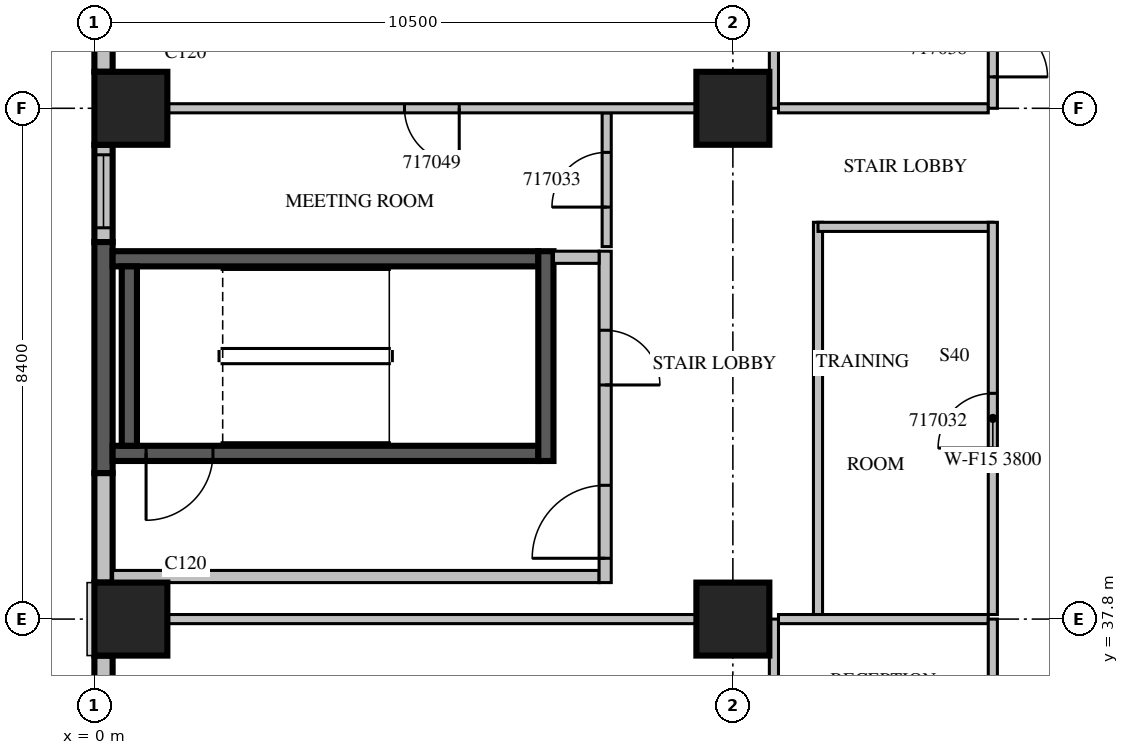
"""IFC4 building model, lengths in metres.
Left out: names, types, materials, properties, quantities, classifications, styles, units other than length and angle.
Written with IfcOpenShell. Run it as: python <this file> out.ifc"""

import sys

from ifc_helpers import new_model, si_unit, direction, frame, frame_2d, origin, origin_2d, place, context, subcontext, project, spatial, rectangle, extrude, source, transform, mapped, element, fill, save


model = new_model("IFC4")
c1 = context("Model", 3, precision=1e-05, world=origin(), true_north=direction((0.0, 1.0)))
c2 = subcontext(c1, "Body", "Model", "MODEL_VIEW")
j1 = project(units=[si_unit("LENGTHUNIT", "METRE"), si_unit("PLANEANGLEUNIT", "RADIAN")], contexts=[c1])
p1 = place(None, origin())
s1 = spatial("IfcSite", under=j1, at=p1, CompositionType="ELEMENT")
p2 = place(p1, origin())
s2 = spatial("IfcBuilding", under=s1, at=p2, CompositionType="ELEMENT")
p3 = place(p2, frame((0.0, 0.0, 82.5)))
s3 = spatial("IfcBuildingStorey", under=s2, at=p3, CompositionType="ELEMENT", Elevation=82.5)
m1 = source(origin(), c2, "Body", "SweptSolid", [
    extrude(rectangle(XDim=1.2, YDim=1.2, at=origin_2d()), origin(), (0.0, 0.0, 1.0), 4.2),
])
for number, where, z_axis, x_axis in (
    (1, (0.6, 37.8, 0.0), (0.0, 0.0, 1.0), (1.0, 0.0, 0.0)),
    (2, (10.5, 37.8, 0.0), (0.0, 0.0, 1.0), (1.0, 0.0, 0.0)),
    (3, (0.6, 46.2, 0.0), (0.0, 0.0, 1.0), (1.0, 0.0, 0.0)),
    (4, (10.5, 46.2, 0.0), (0.0, 0.0, 1.0), (1.0, 0.0, 0.0)),
):
    element("IfcColumn", number, at=place(p3, frame(where, z_axis=z_axis, x_axis=x_axis)), inside=s3, PredefinedType="COLUMN", context=c2, shape_type="MappedRepresentation", body=[
        mapped(m1, transform((0.0, 0.0, 0.0), scale=1.0)),
    ])
m2 = source(origin(), c2, "Body", "SweptSolid", [
    extrude(rectangle(XDim=4.68, YDim=0.3, at=frame_2d((2.34, 0.0))), origin(), (0.0, 0.0, 1.0), 3.8),
])
p4 = place(p3, frame((0.15, 51.48, 0.0), z_axis=(0.0, 0.0, 1.0), x_axis=(0.0, -1.0, 0.0)))
e5 = element("IfcWall", 5, at=p4, inside=s3, PredefinedType="STANDARD", context=c2, shape_type="MappedRepresentation", body=[
    mapped(m2, transform((0.0, 0.0, 0.0), scale=1.0)),
])
m3 = source(origin(), c2, "Body", "SweptSolid", [
    extrude(rectangle(XDim=1.0, YDim=2.1, at=frame_2d((0.5, 1.05))), frame((0.0, 0.16, 0.0), z_axis=(0.0, -1.0, 0.0), x_axis=(1.0, 0.0, 0.0)), (0.0, 0.0, 1.0), 0.32),
])
p5 = place(p4, frame((1.945, 0.0, 0.0)))
e6 = element("IfcOpeningElement", 6, at=p5, cuts=e5, PredefinedType="OPENING", context=c2, shape_type="MappedRepresentation", body=[
    mapped(m3, transform((0.0, 0.0, 0.0), scale=1.0)),
])
m4 = source(origin(), c2, "Body", "SweptSolid", [
    extrude(rectangle(XDim=1.6, YDim=0.3, at=frame_2d((0.8, 0.0))), origin(), (0.0, 0.0, 1.0), 3.8),
])
p6 = place(p3, frame((0.15, 45.6, 0.0), z_axis=(0.0, 0.0, 1.0), x_axis=(0.0, -1.0, 0.0)))
e7 = element("IfcWall", 7, at=p6, inside=s3, PredefinedType="STANDARD", context=c2, shape_type="MappedRepresentation", body=[
    mapped(m4, transform((0.0, 0.0, 0.0), scale=1.0)),
])
m5 = source(origin(), c2, "Body", "SweptSolid", [
    extrude(rectangle(XDim=1.2, YDim=2.7, at=frame_2d((0.6, 1.35))), frame((0.0, 0.16, 0.0), z_axis=(0.0, -1.0, 0.0), x_axis=(1.0, 0.0, 0.0)), (0.0, 0.0, 1.0), 0.32),
])
p7 = place(p6, frame((0.165, 0.0, 0.6)))
e8 = element("IfcOpeningElement", 8, at=p7, cuts=e7, PredefinedType="OPENING", context=c2, shape_type="MappedRepresentation", body=[
    mapped(m5, transform((0.0, 0.0, 0.0), scale=1.0)),
])
m6 = source(origin(), c2, "Body", "SweptSolid", [
    extrude(rectangle(XDim=3.8, YDim=0.3, at=frame_2d((1.9, 0.0))), origin(), (0.0, 0.0, 1.0), 3.8),
])
p8 = place(p3, frame((0.15, 44.0, 0.0), z_axis=(0.0, 0.0, 1.0), x_axis=(0.0, -1.0, 0.0)))
e9 = element("IfcWall", 9, at=p8, inside=s3, PredefinedType="SOLIDWALL", context=c2, shape_type="MappedRepresentation", body=[
    mapped(m6, transform((0.0, 0.0, 0.0), scale=1.0)),
])
m7 = source(origin(), c2, "Body", "SweptSolid", [
    extrude(rectangle(XDim=1.8, YDim=0.3, at=frame_2d((0.9, 0.0))), origin(), (0.0, 0.0, 1.0), 3.8),
])
p9 = place(p3, frame((0.15, 40.2, 0.0), z_axis=(0.0, 0.0, 1.0), x_axis=(0.0, -1.0, 0.0)))
e10 = element("IfcWall", 10, at=p9, inside=s3, PredefinedType="STANDARD", context=c2, shape_type="MappedRepresentation", body=[
    mapped(m7, transform((0.0, 0.0, 0.0), scale=1.0)),
])
m8 = source(origin(), c2, "Body", "SweptSolid", [
    extrude(rectangle(XDim=7.2, YDim=0.3, at=frame_2d((3.6, 0.0))), origin(), (0.0, 0.0, 1.0), 3.8),
])
p10 = place(p3, frame((0.15, 37.2, 0.0), z_axis=(0.0, 0.0, 1.0), x_axis=(0.0, -1.0, 0.0)))
e11 = element("IfcWall", 11, at=p10, inside=s3, PredefinedType="STANDARD", context=c2, shape_type="MappedRepresentation", body=[
    mapped(m8, transform((0.0, 0.0, 0.0), scale=1.0)),
])
m9 = source(origin(), c2, "Body", "SweptSolid", [
    extrude(rectangle(XDim=1.8, YDim=2.7, at=frame_2d((0.9, 1.35))), frame((0.0, 0.16, 0.0), z_axis=(0.0, -1.0, 0.0), x_axis=(1.0, 0.0, 0.0)), (0.0, 0.0, 1.0), 0.32),
])
p11 = place(p10, frame((1.008, 0.0, 0.6)))
e12 = element("IfcOpeningElement", 12, at=p11, cuts=e11, PredefinedType="OPENING", context=c2, shape_type="MappedRepresentation", body=[
    mapped(m9, transform((0.0, 0.0, 0.0), scale=1.0)),
])
m10 = source(origin(), c2, "Body", "SweptSolid", [
    extrude(rectangle(XDim=2.4, YDim=2.7, at=frame_2d((1.2, 1.35))), frame((0.0, 0.16, 0.0), z_axis=(0.0, -1.0, 0.0), x_axis=(1.0, 0.0, 0.0)), (0.0, 0.0, 1.0), 0.32),
])
p12 = place(p10, frame((3.804, 0.0, 0.6)))
e13 = element("IfcOpeningElement", 13, at=p12, cuts=e11, PredefinedType="OPENING", context=c2, shape_type="MappedRepresentation", body=[
    mapped(m10, transform((0.0, 0.0, 0.0), scale=1.0)),
])
m11 = source(origin(), c2, "Body", "SweptSolid", [
    extrude(rectangle(XDim=7.0, YDim=0.25, at=frame_2d((3.5, 0.0))), origin(), (0.0, 0.0, 1.0), 3.8),
])
p13 = place(p3, frame((0.3, 40.525, 0.0), z_axis=(0.0, 0.0, 1.0), x_axis=(1.0, 0.0, 0.0)))
e14 = element("IfcWall", 14, at=p13, inside=s3, PredefinedType="SOLIDWALL", context=c2, shape_type="MappedRepresentation", body=[
    mapped(m11, transform((0.0, 0.0, 0.0), scale=1.0)),
])
m12 = source(origin(), c2, "Body", "SweptSolid", [
    extrude(rectangle(XDim=1.1, YDim=2.1, at=frame_2d((0.55, 1.05))), frame((0.0, 0.135, 0.0), z_axis=(0.0, -1.0, 0.0), x_axis=(1.0, 0.0, 0.0)), (0.0, 0.0, 1.0), 0.27),
])
p14 = place(p13, frame((0.55, 0.0, 0.0)))
e15 = element("IfcOpeningElement", 15, at=p14, cuts=e14, PredefinedType="OPENING", context=c2, shape_type="MappedRepresentation", body=[
    mapped(m12, transform((0.0, 0.0, 0.0), scale=1.0)),
])
p15 = place(p3, frame((0.3, 43.725, 0.0), z_axis=(0.0, 0.0, 1.0), x_axis=(1.0, 0.0, 0.0)))
e16 = element("IfcWall", 16, at=p15, inside=s3, PredefinedType="SOLIDWALL", context=c2, shape_type="MappedRepresentation", body=[
    mapped(m11, transform((0.0, 0.0, 0.0), scale=1.0)),
])
m13 = source(origin(), c2, "Body", "SweptSolid", [
    extrude(rectangle(XDim=3.45, YDim=0.25, at=frame_2d((1.725, 0.0))), origin(), (0.0, 0.0, 1.0), 3.8),
])
p16 = place(p3, frame((7.425, 40.4, 0.0), z_axis=(0.0, 0.0, 1.0), x_axis=(0.0, 1.0, 0.0)))
e17 = element("IfcWall", 17, at=p16, inside=s3, PredefinedType="SOLIDWALL", context=c2, shape_type="MappedRepresentation", body=[
    mapped(m13, transform((0.0, 0.0, 0.0), scale=1.0)),
])
m14 = source(origin(), c2, "Body", "SweptSolid", [
    extrude(rectangle(XDim=2.95, YDim=0.25, at=frame_2d((1.475, 0.0))), origin(), (0.0, 0.0, 1.0), 3.8),
])
p17 = place(p3, frame((0.575, 40.65, 0.0), z_axis=(0.0, 0.0, 1.0), x_axis=(0.0, 1.0, 0.0)))
e18 = element("IfcWall", 18, at=p17, inside=s3, PredefinedType="SOLIDWALL", context=c2, shape_type="MappedRepresentation", body=[
    mapped(m14, transform((0.0, 0.0, 0.0), scale=1.0)),
])
m15 = source(origin(), c2, "Body", "SweptSolid", [
    extrude(rectangle(XDim=8.0, YDim=0.2, at=frame_2d((4.0, 0.0))), origin(), (0.0, 0.0, 1.0), 3.8),
])
p18 = place(p3, frame((0.3, 38.5, 0.0), z_axis=(0.0, 0.0, 1.0), x_axis=(1.0, 0.0, 0.0)))
e19 = element("IfcWall", 19, at=p18, inside=s3, PredefinedType="PARTITIONING", context=c2, shape_type="MappedRepresentation", body=[
    mapped(m15, transform((0.0, 0.0, 0.0), scale=1.0)),
])
m16 = source(origin(), c2, "Body", "SweptSolid", [
    extrude(rectangle(XDim=5.45, YDim=0.2, at=frame_2d((2.725, 0.0))), origin(), (0.0, 0.0, 1.0), 3.8),
])
p19 = place(p3, frame((8.4, 38.4, 0.0), z_axis=(0.0, 0.0, 1.0), x_axis=(0.0, 1.0, 0.0)))
e20 = element("IfcWall", 20, at=p19, inside=s3, PredefinedType="PARTITIONING", context=c2, shape_type="MappedRepresentation", body=[
    mapped(m16, transform((0.0, 0.0, 0.0), scale=1.0)),
])
m17 = source(origin(), c2, "Body", "SweptSolid", [
    extrude(rectangle(XDim=1.2, YDim=2.1, at=frame_2d((0.6, 1.05))), frame((0.0, 0.11, 0.0), z_axis=(0.0, -1.0, 0.0), x_axis=(1.0, 0.0, 0.0)), (0.0, 0.0, 1.0), 0.22),
])
p20 = place(p19, frame((0.4, 0.0, 0.0)))
e21 = element("IfcOpeningElement", 21, at=p20, cuts=e20, PredefinedType="OPENING", context=c2, shape_type="MappedRepresentation", body=[
    mapped(m17, transform((0.0, 0.0, 0.0), scale=1.0)),
])
m18 = source(origin(), c2, "Body", "SweptSolid", [
    extrude(rectangle(XDim=0.9, YDim=2.1, at=frame_2d((0.45, 1.05))), frame((0.0, 0.11, 0.0), z_axis=(0.0, -1.0, 0.0), x_axis=(1.0, 0.0, 0.0)), (0.0, 0.0, 1.0), 0.22),
])
p21 = place(p19, frame((3.25, 0.0, 0.0)))
e22 = element("IfcOpeningElement", 22, at=p21, cuts=e20, PredefinedType="OPENING", context=c2, shape_type="MappedRepresentation", body=[
    mapped(m18, transform((0.0, 0.0, 0.0), scale=1.0)),
])
m19 = source(origin(), c2, "Body", "SweptSolid", [
    extrude(rectangle(XDim=0.75, YDim=0.2, at=frame_2d((0.375, 0.0))), origin(), (0.0, 0.0, 1.0), 3.8),
])
p22 = place(p3, frame((7.55, 43.75, 0.0), z_axis=(0.0, 0.0, 1.0), x_axis=(1.0, 0.0, 0.0)))
e23 = element("IfcWall", 23, at=p22, inside=s3, PredefinedType="PARTITIONING", context=c2, shape_type="MappedRepresentation", body=[
    mapped(m19, transform((0.0, 0.0, 0.0), scale=1.0)),
])
m20 = source(origin(), c2, "Body", "SweptSolid", [
    extrude(rectangle(XDim=6.45, YDim=0.15, at=frame_2d((3.225, 0.0))), origin(), (0.0, 0.0, 1.0), 3.8),
])
p23 = place(p3, frame((11.9, 44.325, 0.0), z_axis=(0.0, 0.0, 1.0), x_axis=(0.0, -1.0, 0.0)))
e24 = element("IfcWall", 24, at=p23, inside=s3, PredefinedType="PARTITIONING", context=c2, shape_type="MappedRepresentation", body=[
    mapped(m20, transform((0.0, 0.0, 0.0), scale=1.0)),
])
m21 = source(origin(), c2, "Body", "SweptSolid", [
    extrude(rectangle(XDim=2.875, YDim=0.15, at=frame_2d((1.438, 0.0))), origin(), (0.0, 0.0, 1.0), 3.8),
])
p24 = place(p3, frame((14.775, 44.25, 0.0), z_axis=(0.0, 0.0, 1.0), x_axis=(-1.0, 0.0, 0.0)))
e25 = element("IfcWall", 25, at=p24, inside=s3, PredefinedType="PARTITIONING", context=c2, shape_type="MappedRepresentation", body=[
    mapped(m21, transform((0.0, 0.0, 0.0), scale=1.0)),
])
p25 = place(p3, frame((14.775, 37.875, 0.0), z_axis=(0.0, 0.0, 1.0), x_axis=(0.0, 1.0, 0.0)))
e26 = element("IfcWall", 26, at=p25, inside=s3, PredefinedType="PARTITIONING", context=c2, shape_type="MappedRepresentation", body=[
    mapped(m20, transform((0.0, 0.0, 0.0), scale=1.0)),
])
m22 = source(origin(), c2, "Body", "SweptSolid", [
    extrude(rectangle(XDim=0.9, YDim=2.1, at=frame_2d((0.45, 1.05))), frame((0.0, 0.085, 0.0), z_axis=(0.0, -1.0, 0.0), x_axis=(1.0, 0.0, 0.0)), (0.0, 0.0, 1.0), 0.17),
])
p26 = place(p25, frame((2.737, 0.0, 0.0)))
e27 = element("IfcOpeningElement", 27, at=p26, cuts=e26, PredefinedType="OPENING", context=c2, shape_type="MappedRepresentation", body=[
    mapped(m22, transform((0.0, 0.0, 0.0), scale=1.0)),
])
m23 = source(origin(), c2, "Body", "SweptSolid", [
    extrude(rectangle(XDim=2.2, YDim=0.15, at=frame_2d((1.1, 0.0))), origin(), (0.0, 0.0, 1.0), 3.8),
])
p27 = place(p3, frame((8.425, 43.925, 0.0), z_axis=(0.0, 0.0, 1.0), x_axis=(0.0, 1.0, 0.0)))
e28 = element("IfcWall", 28, at=p27, inside=s3, PredefinedType="PARTITIONING", context=c2, shape_type="MappedRepresentation", body=[
    mapped(m23, transform((0.0, 0.0, 0.0), scale=1.0)),
])
p28 = place(p27, frame((0.65, 0.0, 0.0)))
e29 = element("IfcOpeningElement", 29, at=p28, cuts=e28, PredefinedType="OPENING", context=c2, shape_type="MappedRepresentation", body=[
    mapped(m22, transform((0.0, 0.0, 0.0), scale=1.0)),
])
m24 = source(origin(), c2, "Body", "SweptSolid", [
    extrude(rectangle(XDim=8.702, YDim=0.15, at=frame_2d((4.351, 0.0))), origin(), (0.0, 0.0, 1.0), 3.8),
])
p29 = place(p3, frame((9.901, 37.8, 0.0), z_axis=(0.0, 0.0, 1.0), x_axis=(-1.0, 0.0, 0.0)))
e30 = element("IfcWall", 30, at=p29, inside=s3, PredefinedType="PARTITIONING", context=c2, shape_type="MappedRepresentation", body=[
    mapped(m24, transform((0.0, 0.0, 0.0), scale=1.0)),
])
m25 = source(origin(), c2, "Body", "SweptSolid", [
    extrude(rectangle(XDim=3.45, YDim=0.15, at=frame_2d((1.725, 0.0))), origin(), (0.0, 0.0, 1.0), 3.8),
])
p30 = place(p3, frame((14.7, 37.8, 0.0), z_axis=(0.0, 0.0, 1.0), x_axis=(-1.0, 0.0, 0.0)))
e31 = element("IfcWall", 31, at=p30, inside=s3, PredefinedType="PARTITIONING", context=c2, shape_type="MappedRepresentation", body=[
    mapped(m25, transform((0.0, 0.0, 0.0), scale=1.0)),
])
m26 = source(origin(), c2, "Body", "SweptSolid", [
    extrude(rectangle(XDim=8.4, YDim=0.15, at=frame_2d((4.2, 0.0))), origin(), (0.0, 0.0, 1.0), 3.8),
])
p31 = place(p3, frame((11.175, 29.4, 0.0), z_axis=(0.0, 0.0, 1.0), x_axis=(0.0, 1.0, 0.0)))
e32 = element("IfcWall", 32, at=p31, inside=s3, PredefinedType="PARTITIONING", context=c2, shape_type="MappedRepresentation", body=[
    mapped(m26, transform((0.0, 0.0, 0.0), scale=1.0)),
])
m27 = source(origin(), c2, "Body", "SweptSolid", [
    extrude(rectangle(XDim=1.1, YDim=2.1, at=frame_2d((0.55, 1.05))), frame((0.0, 0.085, 0.0), z_axis=(0.0, -1.0, 0.0), x_axis=(1.0, 0.0, 0.0)), (0.0, 0.0, 1.0), 0.17),
])
p32 = place(p31, frame((5.883, 0.0, 0.0)))
e33 = element("IfcOpeningElement", 33, at=p32, cuts=e32, PredefinedType="OPENING", context=c2, shape_type="MappedRepresentation", body=[
    mapped(m27, transform((0.0, 0.0, 0.0), scale=1.0)),
])
p33 = place(p3, frame((9.901, 46.2, 0.0), z_axis=(0.0, 0.0, 1.0), x_axis=(-1.0, 0.0, 0.0)))
e34 = element("IfcWall", 34, at=p33, inside=s3, PredefinedType="PARTITIONING", context=c2, shape_type="MappedRepresentation", body=[
    mapped(m24, transform((0.0, 0.0, 0.0), scale=1.0)),
])
p34 = place(p33, frame((3.901, 0.0, 0.0)))
e35 = element("IfcOpeningElement", 35, at=p34, cuts=e34, PredefinedType="OPENING", context=c2, shape_type="MappedRepresentation", body=[
    mapped(m22, transform((0.0, 0.0, 0.0), scale=1.0)),
])
p35 = place(p3, frame((14.7, 46.2, 0.0), z_axis=(0.0, 0.0, 1.0), x_axis=(-1.0, 0.0, 0.0)))
e36 = element("IfcWall", 36, at=p35, inside=s3, PredefinedType="PARTITIONING", context=c2, shape_type="MappedRepresentation", body=[
    mapped(m25, transform((0.0, 0.0, 0.0), scale=1.0)),
])
p36 = place(p3, frame((11.175, 46.2, 0.0), z_axis=(0.0, 0.0, 1.0), x_axis=(0.0, 1.0, 0.0)))
e37 = element("IfcWall", 37, at=p36, inside=s3, PredefinedType="PARTITIONING", context=c2, shape_type="SweptSolid", body=[
    extrude(rectangle(XDim=13.235, YDim=0.15, at=frame_2d((6.617, 0.0))), origin(), (0.0, 0.0, 1.0), 3.3),
])
p37 = place(p3, frame((14.775, 29.4, 0.0), z_axis=(0.0, 0.0, 1.0), x_axis=(0.0, 1.0, 0.0)))
e38 = element("IfcWall", 38, at=p37, inside=s3, PredefinedType="PARTITIONING", context=c2, shape_type="MappedRepresentation", body=[
    mapped(m26, transform((0.0, 0.0, 0.0), scale=1.0)),
])
p38 = place(p37, frame((6.146, 0.0, 0.0)))
e39 = element("IfcOpeningElement", 39, at=p38, cuts=e38, PredefinedType="OPENING", context=c2, shape_type="MappedRepresentation", body=[
    mapped(m27, transform((0.0, 0.0, 0.0), scale=1.0)),
])
p39 = place(p37, frame((0.781, 0.0, 0.0)))
e40 = element("IfcOpeningElement", 40, at=p39, cuts=e38, PredefinedType="OPENING", context=c2, shape_type="MappedRepresentation", body=[
    mapped(m22, transform((0.0, 0.0, 0.0), scale=1.0)),
])
p40 = place(p37, frame((3.276, 0.0, 0.0)))
e41 = element("IfcOpeningElement", 41, at=p40, cuts=e38, PredefinedType="OPENING", context=c2, shape_type="MappedRepresentation", body=[
    mapped(m22, transform((0.0, 0.0, 0.0), scale=1.0)),
])
m28 = source(origin(), c2, "Body", "SweptSolid", [
    extrude(rectangle(XDim=13.235, YDim=0.15, at=frame_2d((6.617, 0.0))), origin(), (0.0, 0.0, 1.0), 3.3),
])
p41 = place(p3, frame((14.775, 46.2, 0.0), z_axis=(0.0, 0.0, 1.0), x_axis=(0.0, 1.0, 0.0)))
e42 = element("IfcWall", 42, at=p41, inside=s3, PredefinedType="PARTITIONING", context=c2, shape_type="MappedRepresentation", body=[
    mapped(m28, transform((0.0, 0.0, 0.0), scale=1.0)),
])
p42 = place(p41, frame((0.516, 0.0, 0.0)))
e43 = element("IfcOpeningElement", 43, at=p42, cuts=e42, PredefinedType="OPENING", context=c2, shape_type="MappedRepresentation", body=[
    mapped(m22, transform((0.0, 0.0, 0.0), scale=1.0)),
])
p43 = place(p41, frame((3.456, 0.0, 0.0)))
e44 = element("IfcOpeningElement", 44, at=p43, cuts=e42, PredefinedType="OPENING", context=c2, shape_type="MappedRepresentation", body=[
    mapped(m22, transform((0.0, 0.0, 0.0), scale=1.0)),
])
p44 = place(p41, frame((6.46, 0.0, 0.0)))
e45 = element("IfcOpeningElement", 45, at=p44, cuts=e42, PredefinedType="OPENING", context=c2, shape_type="MappedRepresentation", body=[
    mapped(m22, transform((0.0, 0.0, 0.0), scale=1.0)),
])
p45 = place(p41, frame((9.265, 0.0, 0.0)))
e46 = element("IfcOpeningElement", 46, at=p45, cuts=e42, PredefinedType="OPENING", context=c2, shape_type="MappedRepresentation", body=[
    mapped(m22, transform((0.0, 0.0, 0.0), scale=1.0)),
])
m29 = source(origin(), c2, "Body", "SweptSolid", [
    extrude(rectangle(XDim=1.2, YDim=2.7, at=frame_2d((0.6, 1.35))), frame((0.0, 0.03, 0.0), z_axis=(0.0, -1.0, 0.0), x_axis=(1.0, 0.0, 0.0)), (0.0, 0.0, 1.0), 0.06),
])
p46 = place(p7, origin())
e47 = element("IfcWindow", 47, at=p46, inside=s3, PartitioningType="SINGLE_PANEL", PredefinedType="WINDOW", context=c2, shape_type="MappedRepresentation", body=[
    mapped(m29, transform((0.0, 0.0, 0.0), scale=1.0)),
])
fill(e8, e47)
m30 = source(origin(), c2, "Body", "SweptSolid", [
    extrude(rectangle(XDim=1.1, YDim=2.1, at=frame_2d((0.55, 1.05))), frame((0.0, 0.025, 0.0), z_axis=(0.0, -1.0, 0.0), x_axis=(1.0, 0.0, 0.0)), (0.0, 0.0, 1.0), 0.05),
])
p47 = place(p14, origin())
e48 = element("IfcDoor", 48, at=p47, inside=s3, OperationType="SINGLE_SWING_RIGHT", PredefinedType="DOOR", context=c2, shape_type="MappedRepresentation", body=[
    mapped(m30, transform((0.0, 0.0, 0.0), scale=1.0)),
])
fill(e15, e48)
m31 = source(origin(), c2, "Body", "SweptSolid", [
    extrude(rectangle(XDim=1.2, YDim=2.1, at=frame_2d((0.6, 1.05))), frame((0.0, 0.025, 0.0), z_axis=(0.0, -1.0, 0.0), x_axis=(1.0, 0.0, 0.0)), (0.0, 0.0, 1.0), 0.05),
])
p48 = place(p20, origin())
e49 = element("IfcDoor", 49, at=p48, inside=s3, OperationType="SINGLE_SWING_LEFT", PredefinedType="DOOR", context=c2, shape_type="MappedRepresentation", body=[
    mapped(m31, transform((0.0, 0.0, 0.0), scale=1.0)),
])
fill(e21, e49)
m32 = source(origin(), c2, "Body", "SweptSolid", [
    extrude(rectangle(XDim=0.9, YDim=2.1, at=frame_2d((0.45, 1.05))), frame((0.0, 0.025, 0.0), z_axis=(0.0, -1.0, 0.0), x_axis=(1.0, 0.0, 0.0)), (0.0, 0.0, 1.0), 0.05),
])
p49 = place(p21, origin())
e50 = element("IfcDoor", 50, at=p49, inside=s3, OperationType="SINGLE_SWING_RIGHT", PredefinedType="DOOR", context=c2, shape_type="MappedRepresentation", body=[
    mapped(m32, transform((0.0, 0.0, 0.0), scale=1.0)),
])
fill(e22, e50)
p50 = place(p26, origin())
e51 = element("IfcDoor", 51, at=p50, inside=s3, OperationType="SINGLE_SWING_LEFT", PredefinedType="DOOR", context=c2, shape_type="MappedRepresentation", body=[
    mapped(m32, transform((0.0, 0.0, 0.0), scale=1.0)),
])
fill(e27, e51)
p51 = place(p28, origin())
e52 = element("IfcDoor", 52, at=p51, inside=s3, OperationType="SINGLE_SWING_LEFT", PredefinedType="DOOR", context=c2, shape_type="MappedRepresentation", body=[
    mapped(m32, transform((0.0, 0.0, 0.0), scale=1.0)),
])
fill(e29, e52)
p52 = place(p42, origin())
e53 = element("IfcDoor", 53, at=p52, inside=s3, OperationType="SINGLE_SWING_RIGHT", PredefinedType="DOOR", context=c2, shape_type="MappedRepresentation", body=[
    mapped(m32, transform((0.0, 0.0, 0.0), scale=1.0)),
])
fill(e43, e53)
p53 = place(p34, origin())
e54 = element("IfcDoor", 54, at=p53, inside=s3, OperationType="SINGLE_SWING_LEFT", PredefinedType="DOOR", context=c2, shape_type="MappedRepresentation", body=[
    mapped(m32, transform((0.0, 0.0, 0.0), scale=1.0)),
])
fill(e35, e54)
save(model, sys.argv[1])
